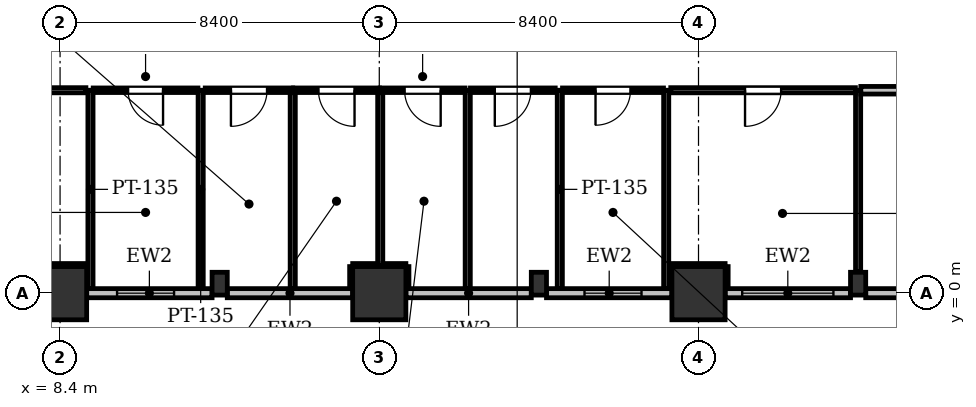
"""IFC4 building model, lengths in metres.
Left out: names, types, materials, properties, quantities, classifications, styles, units other than length and angle.
Written with IfcOpenShell. Run it as: python <this file> out.ifc"""

import sys

from ifc_helpers import new_model, si_unit, direction, frame, frame_2d, origin, origin_2d, place, context, subcontext, project, spatial, rectangle, extrude, element, fill, save


model = new_model("IFC4")
c1 = context("Model", 3, precision=1e-05, world=origin(), true_north=direction((0.0, 1.0)))
c2 = subcontext(c1, "Body", "Model", "MODEL_VIEW")
j1 = project(units=[si_unit("LENGTHUNIT", "METRE"), si_unit("PLANEANGLEUNIT", "RADIAN")], contexts=[c1])
p1 = place(None, origin())
s1 = spatial("IfcSite", under=j1, at=p1, CompositionType="ELEMENT")
p2 = place(p1, origin())
s2 = spatial("IfcBuilding", under=s1, at=p2, CompositionType="ELEMENT")
p3 = place(p2, frame((0.0, 0.0, 10.2)))
s3 = spatial("IfcBuildingStorey", under=s2, at=p3, CompositionType="ELEMENT", Elevation=10.2)
for number, where, z_axis, x_axis in (
    (1, (8.4, 0.0, 0.0), (0.0, 0.0, 1.0), (1.0, 0.0, 0.0)),
    (2, (16.8, 0.0, 0.0), (0.0, 0.0, 1.0), (1.0, 0.0, 0.0)),
    (3, (25.2, 0.0, 0.0), (0.0, 0.0, 1.0), (1.0, 0.0, 0.0)),
):
    element("IfcColumn", number, at=place(p3, frame(where, z_axis=z_axis, x_axis=x_axis)), inside=s3, PredefinedType="COLUMN", context=c2, shape_type="SweptSolid", body=[
        extrude(rectangle(XDim=1.4, YDim=1.4, at=origin_2d()), origin(), (0.0, 0.0, 1.0), 4.8),
    ])
for number, where, z_axis, x_axis in (
    (4, (12.6, 0.25, 0.0), (0.0, 0.0, 1.0), (1.0, 0.0, 0.0)),
    (5, (21.0, 0.25, 0.0), (0.0, 0.0, 1.0), (1.0, 0.0, 0.0)),
    (6, (29.4, 0.25, 0.0), (0.0, 0.0, 1.0), (1.0, 0.0, 0.0)),
):
    element("IfcColumn", number, at=place(p3, frame(where, z_axis=z_axis, x_axis=x_axis)), inside=s3, PredefinedType="PILASTER", context=c2, shape_type="SweptSolid", body=[
        extrude(rectangle(XDim=0.4, YDim=0.6, at=origin_2d()), origin(), (0.0, 0.0, 1.0), 4.8),
    ])
p4 = place(p3, frame((32.9, 0.0, 0.0), z_axis=(0.0, 0.0, 1.0), x_axis=(-1.0, 0.0, 0.0)))
e7 = element("IfcWall", 7, at=p4, inside=s3, PredefinedType="STANDARD", context=c2, shape_type="SweptSolid", body=[
    extrude(rectangle(XDim=3.3, YDim=0.24, at=frame_2d((1.65, 0.0))), origin(), (0.0, 0.0, 1.0), 3.725),
])
p5 = place(p4, frame((0.9, 0.0, 0.9)))
e8 = element("IfcOpeningElement", 8, at=p5, cuts=e7, PredefinedType="OPENING", context=c2, shape_type="SweptSolid", body=[
    extrude(rectangle(XDim=1.5, YDim=1.6, at=frame_2d((0.75, 0.8))), frame((0.0, 0.13, 0.0), z_axis=(0.0, -1.0, 0.0), x_axis=(1.0, 0.0, 0.0)), (0.0, 0.0, 1.0), 0.26),
])
p6 = place(p3, frame((29.2, 0.0, 0.0), z_axis=(0.0, 0.0, 1.0), x_axis=(-1.0, 0.0, 0.0)))
e9 = element("IfcWall", 9, at=p6, inside=s3, PredefinedType="STANDARD", context=c2, shape_type="SweptSolid", body=[
    extrude(rectangle(XDim=3.3, YDim=0.24, at=frame_2d((1.65, 0.0))), origin(), (0.0, 0.0, 1.0), 3.725),
])
p7 = place(p6, frame((0.45, 0.0, 0.9)))
e10 = element("IfcOpeningElement", 10, at=p7, cuts=e9, PredefinedType="OPENING", context=c2, shape_type="SweptSolid", body=[
    extrude(rectangle(XDim=2.4, YDim=1.8, at=frame_2d((1.2, 0.9))), frame((0.0, 0.13, 0.0), z_axis=(0.0, -1.0, 0.0), x_axis=(1.0, 0.0, 0.0)), (0.0, 0.0, 1.0), 0.26),
])
p8 = place(p3, frame((24.5, 0.0, 0.0), z_axis=(0.0, 0.0, 1.0), x_axis=(-1.0, 0.0, 0.0)))
e11 = element("IfcWall", 11, at=p8, inside=s3, PredefinedType="STANDARD", context=c2, shape_type="SweptSolid", body=[
    extrude(rectangle(XDim=3.3, YDim=0.24, at=frame_2d((1.65, 0.0))), origin(), (0.0, 0.0, 1.0), 3.725),
])
p9 = place(p8, frame((0.8, 0.0, 0.9)))
e12 = element("IfcOpeningElement", 12, at=p9, cuts=e11, PredefinedType="OPENING", context=c2, shape_type="SweptSolid", body=[
    extrude(rectangle(XDim=1.5, YDim=1.6, at=frame_2d((0.75, 0.8))), frame((0.0, 0.13, 0.0), z_axis=(0.0, -1.0, 0.0), x_axis=(1.0, 0.0, 0.0)), (0.0, 0.0, 1.0), 0.26),
])
for number, where, z_axis, x_axis in (
    (13, (20.8, 0.0, 0.0), (0.0, 0.0, 1.0), (-1.0, 0.0, 0.0)),
    (14, (16.1, 0.0, 0.0), (0.0, 0.0, 1.0), (-1.0, 0.0, 0.0)),
):
    element("IfcWall", number, at=place(p3, frame(where, z_axis=z_axis, x_axis=x_axis)), inside=s3, PredefinedType="STANDARD", context=c2, shape_type="SweptSolid", body=[
        extrude(rectangle(XDim=3.3, YDim=0.24, at=frame_2d((1.65, 0.0))), origin(), (0.0, 0.0, 1.0), 3.725),
    ])
p10 = place(p3, frame((12.4, 0.0, 0.0), z_axis=(0.0, 0.0, 1.0), x_axis=(-1.0, 0.0, 0.0)))
e15 = element("IfcWall", 15, at=p10, inside=s3, PredefinedType="STANDARD", context=c2, shape_type="SweptSolid", body=[
    extrude(rectangle(XDim=3.3, YDim=0.24, at=frame_2d((1.65, 0.0))), origin(), (0.0, 0.0, 1.0), 3.725),
])
p11 = place(p10, frame((1.0, 0.0, 0.9)))
e16 = element("IfcOpeningElement", 16, at=p11, cuts=e15, PredefinedType="OPENING", context=c2, shape_type="SweptSolid", body=[
    extrude(rectangle(XDim=1.5, YDim=1.6, at=frame_2d((0.75, 0.8))), frame((0.0, 0.13, 0.0), z_axis=(0.0, -1.0, 0.0), x_axis=(1.0, 0.0, 0.0)), (0.0, 0.0, 1.0), 0.26),
])
for number, where, z_axis, x_axis in (
    (17, (9.2, 5.34, 0.0), (0.0, 0.0, 1.0), (0.0, -1.0, 0.0)),
    (18, (12.1, 0.124, 0.0), (0.0, 0.0, 1.0), (0.0, 1.0, 0.0)),
):
    element("IfcWall", number, at=place(p3, frame(where, z_axis=z_axis, x_axis=x_axis)), inside=s3, PredefinedType="PARTITIONING", context=c2, shape_type="SweptSolid", body=[
        extrude(rectangle(XDim=5.216, YDim=0.135, at=frame_2d((2.608, 0.0))), origin(), (0.0, 0.0, 1.0), 4.525),
    ])
p12 = place(p3, frame((12.029, 5.34, 0.0), z_axis=(0.0, 0.0, 1.0), x_axis=(-1.0, 0.0, 0.0)))
e19 = element("IfcWall", 19, at=p12, inside=s3, PredefinedType="PARTITIONING", context=c2, shape_type="SweptSolid", body=[
    extrude(rectangle(XDim=2.757, YDim=0.12, at=frame_2d((1.378, 0.0))), origin(), (0.0, 0.0, 1.0), 4.525),
])
p13 = place(p12, frame((0.918, 0.0, 0.0)))
e20 = element("IfcOpeningElement", 20, at=p13, cuts=e19, PredefinedType="OPENING", context=c2, shape_type="SweptSolid", body=[
    extrude(rectangle(XDim=0.92, YDim=2.1, at=frame_2d((0.46, 1.05))), frame((0.0, 0.07, 0.0), z_axis=(0.0, -1.0, 0.0), x_axis=(1.0, 0.0, 0.0)), (0.0, 0.0, 1.0), 0.14),
])
for number, where, z_axis, x_axis in (
    (21, (21.55, 5.34, 0.0), (0.0, 0.0, 1.0), (0.0, -1.0, 0.0)),
    (22, (24.35, 0.124, 0.0), (0.0, 0.0, 1.0), (0.0, 1.0, 0.0)),
):
    element("IfcWall", number, at=place(p3, frame(where, z_axis=z_axis, x_axis=x_axis)), inside=s3, PredefinedType="PARTITIONING", context=c2, shape_type="SweptSolid", body=[
        extrude(rectangle(XDim=5.216, YDim=0.135, at=frame_2d((2.608, 0.0))), origin(), (0.0, 0.0, 1.0), 4.525),
    ])
p14 = place(p3, frame((24.279, 5.34, 0.0), z_axis=(0.0, 0.0, 1.0), x_axis=(-1.0, 0.0, 0.0)))
e23 = element("IfcWall", 23, at=p14, inside=s3, PredefinedType="PARTITIONING", context=c2, shape_type="SweptSolid", body=[
    extrude(rectangle(XDim=2.657, YDim=0.12, at=frame_2d((1.329, 0.0))), origin(), (0.0, 0.0, 1.0), 4.525),
])
p15 = place(p14, frame((0.868, 0.0, 0.0)))
e24 = element("IfcOpeningElement", 24, at=p15, cuts=e23, PredefinedType="OPENING", context=c2, shape_type="SweptSolid", body=[
    extrude(rectangle(XDim=0.92, YDim=2.1, at=frame_2d((0.46, 1.05))), frame((0.0, 0.07, 0.0), z_axis=(0.0, -1.0, 0.0), x_axis=(1.0, 0.0, 0.0)), (0.0, 0.0, 1.0), 0.14),
])
p16 = place(p3, frame((19.127, 0.124, 0.0), z_axis=(0.0, 0.0, 1.0), x_axis=(0.0, 1.0, 0.0)))
e25 = element("IfcWall", 25, at=p16, inside=s3, PredefinedType="PARTITIONING", context=c2, shape_type="SweptSolid", body=[
    extrude(rectangle(XDim=5.216, YDim=0.135, at=frame_2d((2.608, 0.0))), origin(), (0.0, 0.0, 1.0), 4.525),
])
p17 = place(p3, frame((19.056, 5.34, 0.0), z_axis=(0.0, 0.0, 1.0), x_axis=(-1.0, 0.0, 0.0)))
e26 = element("IfcWall", 26, at=p17, inside=s3, PredefinedType="PARTITIONING", context=c2, shape_type="SweptSolid", body=[
    extrude(rectangle(XDim=2.231, YDim=0.12, at=frame_2d((1.115, 0.0))), origin(), (0.0, 0.0, 1.0), 3.913),
])
p18 = place(p17, frame((0.64, 0.0, 0.0)))
e27 = element("IfcOpeningElement", 27, at=p18, cuts=e26, PredefinedType="OPENING", context=c2, shape_type="SweptSolid", body=[
    extrude(rectangle(XDim=0.95, YDim=2.15, at=frame_2d((0.475, 1.075))), frame((0.0, 0.07, 0.0), z_axis=(0.0, -1.0, 0.0), x_axis=(1.0, 0.0, 0.0)), (0.0, 0.0, 1.0), 0.14),
])
p19 = place(p3, frame((16.825, 5.276, 0.0), z_axis=(0.0, 0.0, 1.0), x_axis=(0.0, -1.0, 0.0)))
e28 = element("IfcWall", 28, at=p19, inside=s3, PredefinedType="PARTITIONING", context=c2, shape_type="SweptSolid", body=[
    extrude(rectangle(XDim=4.556, YDim=0.135, at=frame_2d((2.278, 0.0))), origin(), (0.0, 0.0, 1.0), 3.913),
])
p20 = place(p3, frame((16.896, 0.72, 0.0), z_axis=(0.0, 0.0, 1.0), x_axis=(1.0, 0.0, 0.0)))
e29 = element("IfcWall", 29, at=p20, inside=s3, PredefinedType="PARTITIONING", context=c2, shape_type="SweptSolid", body=[
    extrude(rectangle(XDim=0.604, YDim=0.12, at=frame_2d((0.302, 0.0))), origin(), (0.0, 0.0, 1.0), 4.525),
])
p21 = place(p3, frame((17.52, 0.7, 0.0), z_axis=(0.0, 0.0, 1.0), x_axis=(0.0, -1.0, 0.0)))
e30 = element("IfcWall", 30, at=p21, inside=s3, PredefinedType="PARTITIONING", context=c2, shape_type="SweptSolid", body=[
    extrude(rectangle(XDim=0.576, YDim=0.12, at=frame_2d((0.288, 0.0))), origin(), (0.0, 0.0, 1.0), 4.525),
])
p22 = place(p3, frame((14.522, 5.34, 0.0), z_axis=(0.0, 0.0, 1.0), x_axis=(-1.0, 0.0, 0.0)))
e31 = element("IfcWall", 31, at=p22, inside=s3, PredefinedType="PARTITIONING", context=c2, shape_type="SweptSolid", body=[
    extrude(rectangle(XDim=2.302, YDim=0.12, at=frame_2d((1.151, 0.0))), origin(), (0.0, 0.0, 1.0), 4.122),
])
p23 = place(p22, frame((0.676, 0.0, 0.0)))
e32 = element("IfcOpeningElement", 32, at=p23, cuts=e31, PredefinedType="OPENING", context=c2, shape_type="SweptSolid", body=[
    extrude(rectangle(XDim=0.95, YDim=2.15, at=frame_2d((0.475, 1.075))), frame((0.0, 0.07, 0.0), z_axis=(0.0, -1.0, 0.0), x_axis=(1.0, 0.0, 0.0)), (0.0, 0.0, 1.0), 0.14),
])
p24 = place(p3, frame((14.522, 0.124, 0.0), z_axis=(0.0, 0.0, 1.0), x_axis=(0.0, 1.0, 0.0)))
e33 = element("IfcWall", 33, at=p24, inside=s3, PredefinedType="PARTITIONING", context=c2, shape_type="SweptSolid", body=[
    extrude(rectangle(XDim=5.152, YDim=0.135, at=frame_2d((2.576, 0.0))), origin(), (0.0, 0.0, 1.0), 4.525),
])
p25 = place(p3, frame((16.08, 0.124, 0.0), z_axis=(0.0, 0.0, 1.0), x_axis=(0.0, 1.0, 0.0)))
e34 = element("IfcWall", 34, at=p25, inside=s3, PredefinedType="PARTITIONING", context=c2, shape_type="SweptSolid", body=[
    extrude(rectangle(XDim=0.576, YDim=0.12, at=frame_2d((0.288, 0.0))), origin(), (0.0, 0.0, 1.0), 4.525),
])
p26 = place(p3, frame((16.1, 0.72, 0.0), z_axis=(0.0, 0.0, 1.0), x_axis=(1.0, 0.0, 0.0)))
e35 = element("IfcWall", 35, at=p26, inside=s3, PredefinedType="PARTITIONING", context=c2, shape_type="SweptSolid", body=[
    extrude(rectangle(XDim=0.653, YDim=0.12, at=frame_2d((0.327, 0.0))), origin(), (0.0, 0.0, 1.0), 3.913),
])
p27 = place(p3, frame((16.805, 5.34, 0.0), z_axis=(0.0, 0.0, 1.0), x_axis=(-1.0, 0.0, 0.0)))
e36 = element("IfcWall", 36, at=p27, inside=s3, PredefinedType="PARTITIONING", context=c2, shape_type="SweptSolid", body=[
    extrude(rectangle(XDim=2.262, YDim=0.12, at=frame_2d((1.131, 0.0))), origin(), (0.0, 0.0, 1.0), 3.913),
])
p28 = place(p27, frame((0.656, 0.0, 0.0)))
e37 = element("IfcOpeningElement", 37, at=p28, cuts=e36, PredefinedType="OPENING", context=c2, shape_type="SweptSolid", body=[
    extrude(rectangle(XDim=0.95, YDim=2.15, at=frame_2d((0.475, 1.075))), frame((0.0, 0.07, 0.0), z_axis=(0.0, -1.0, 0.0), x_axis=(1.0, 0.0, 0.0)), (0.0, 0.0, 1.0), 0.14),
])
p29 = place(p3, frame((21.43, 5.34, 0.0), z_axis=(0.0, 0.0, 1.0), x_axis=(-1.0, 0.0, 0.0)))
e38 = element("IfcWall", 38, at=p29, inside=s3, PredefinedType="PARTITIONING", context=c2, shape_type="SweptSolid", body=[
    extrude(rectangle(XDim=2.231, YDim=0.12, at=frame_2d((1.115, 0.0))), origin(), (0.0, 0.0, 1.0), 4.122),
])
p30 = place(p29, frame((0.64, 0.0, 0.0)))
e39 = element("IfcOpeningElement", 39, at=p30, cuts=e38, PredefinedType="OPENING", context=c2, shape_type="SweptSolid", body=[
    extrude(rectangle(XDim=0.95, YDim=2.15, at=frame_2d((0.475, 1.075))), frame((0.0, 0.07, 0.0), z_axis=(0.0, -1.0, 0.0), x_axis=(1.0, 0.0, 0.0)), (0.0, 0.0, 1.0), 0.14),
])
p31 = place(p3, frame((24.5, 0.72, 0.0), z_axis=(0.0, 0.0, 1.0), x_axis=(1.0, 0.0, 0.0)))
e40 = element("IfcWall", 40, at=p31, inside=s3, PredefinedType="PARTITIONING", context=c2, shape_type="SweptSolid", body=[
    extrude(rectangle(XDim=1.4, YDim=0.12, at=frame_2d((0.7, 0.0))), origin(), (0.0, 0.0, 1.0), 3.913),
])
p32 = place(p3, frame((25.92, 0.7, 0.0), z_axis=(0.0, 0.0, 1.0), x_axis=(0.0, -1.0, 0.0)))
e41 = element("IfcWall", 41, at=p32, inside=s3, PredefinedType="PARTITIONING", context=c2, shape_type="SweptSolid", body=[
    extrude(rectangle(XDim=0.576, YDim=0.12, at=frame_2d((0.288, 0.0))), origin(), (0.0, 0.0, 1.0), 4.525),
])
p33 = place(p3, frame((29.4, 0.57, 0.0), z_axis=(0.0, 0.0, 1.0), x_axis=(0.0, 1.0, 0.0)))
e42 = element("IfcWall", 42, at=p33, inside=s3, PredefinedType="PARTITIONING", context=c2, shape_type="SweptSolid", body=[
    extrude(rectangle(XDim=4.77, YDim=0.135, at=frame_2d((2.385, 0.0))), origin(), (0.0, 0.0, 1.0), 4.122),
])
p34 = place(p3, frame((29.329, 5.34, 0.0), z_axis=(0.0, 0.0, 1.0), x_axis=(-1.0, 0.0, 0.0)))
e43 = element("IfcWall", 43, at=p34, inside=s3, PredefinedType="PARTITIONING", context=c2, shape_type="SweptSolid", body=[
    extrude(rectangle(XDim=4.859, YDim=0.135, at=frame_2d((2.429, 0.0))), origin(), (0.0, 0.0, 1.0), 3.913),
])
p35 = place(p34, frame((1.954, 0.0, 0.0)))
e44 = element("IfcOpeningElement", 44, at=p35, cuts=e43, PredefinedType="OPENING", context=c2, shape_type="SweptSolid", body=[
    extrude(rectangle(XDim=0.95, YDim=2.15, at=frame_2d((0.475, 1.075))), frame((0.0, 0.077, 0.0), z_axis=(0.0, -1.0, 0.0), x_axis=(1.0, 0.0, 0.0)), (0.0, 0.0, 1.0), 0.155),
])
p36 = place(p3, frame((44.05, 5.34, 0.0), z_axis=(0.0, 0.0, 1.0), x_axis=(-1.0, 0.0, 0.0)))
e45 = element("IfcWall", 45, at=p36, inside=s3, PredefinedType="PARTITIONING", context=c2, shape_type="SweptSolid", body=[
    extrude(rectangle(XDim=14.579, YDim=0.2, at=frame_2d((7.289, 0.0))), origin(), (0.0, 0.0, 1.0), 3.913),
])
p37 = place(p36, frame((6.789, 0.0, 0.0)))
e46 = element("IfcOpeningElement", 46, at=p37, cuts=e45, PredefinedType="OPENING", context=c2, shape_type="SweptSolid", body=[
    extrude(rectangle(XDim=1.0, YDim=2.15, at=frame_2d((0.5, 1.075))), frame((0.0, 0.11, 0.0), z_axis=(0.0, -1.0, 0.0), x_axis=(1.0, 0.0, 0.0)), (0.0, 0.0, 1.0), 0.22),
])
p38 = place(p3, frame((7.7, 0.72, 0.0), z_axis=(0.0, 0.0, 1.0), x_axis=(1.0, 0.0, 0.0)))
e47 = element("IfcWall", 47, at=p38, inside=s3, PredefinedType="PARTITIONING", context=c2, shape_type="SweptSolid", body=[
    extrude(rectangle(XDim=1.38, YDim=0.12, at=frame_2d((0.69, 0.0))), origin(), (0.0, 0.0, 1.0), 3.913),
])
p39 = place(p3, frame((9.08, 5.34, 0.0), z_axis=(0.0, 0.0, 1.0), x_axis=(-1.0, 0.0, 0.0)))
e48 = element("IfcWall", 48, at=p39, inside=s3, PredefinedType="PARTITIONING", context=c2, shape_type="SweptSolid", body=[
    extrude(rectangle(XDim=3.68, YDim=0.135, at=frame_2d((1.84, 0.0))), origin(), (0.0, 0.0, 1.0), 3.913),
])
p40 = place(p7, origin())
e49 = element("IfcWindow", 49, at=p40, inside=s3, PartitioningType="SINGLE_PANEL", PredefinedType="WINDOW", context=c2, shape_type="SweptSolid", body=[
    extrude(rectangle(XDim=2.4, YDim=1.8, at=frame_2d((1.2, 0.9))), frame((0.0, 0.03, 0.0), z_axis=(0.0, -1.0, 0.0), x_axis=(1.0, 0.0, 0.0)), (0.0, 0.0, 1.0), 0.06),
])
fill(e10, e49)
p41 = place(p9, origin())
e50 = element("IfcWindow", 50, at=p41, inside=s3, PartitioningType="SINGLE_PANEL", PredefinedType="WINDOW", context=c2, shape_type="SweptSolid", body=[
    extrude(rectangle(XDim=1.5, YDim=1.6, at=frame_2d((0.75, 0.8))), frame((0.0, 0.03, 0.0), z_axis=(0.0, -1.0, 0.0), x_axis=(1.0, 0.0, 0.0)), (0.0, 0.0, 1.0), 0.06),
])
fill(e12, e50)
p42 = place(p11, origin())
e51 = element("IfcWindow", 51, at=p42, inside=s3, PartitioningType="SINGLE_PANEL", PredefinedType="WINDOW", context=c2, shape_type="SweptSolid", body=[
    extrude(rectangle(XDim=1.5, YDim=1.6, at=frame_2d((0.75, 0.8))), frame((0.0, 0.03, 0.0), z_axis=(0.0, -1.0, 0.0), x_axis=(1.0, 0.0, 0.0)), (0.0, 0.0, 1.0), 0.06),
])
fill(e16, e51)
p43 = place(p13, origin())
e52 = element("IfcDoor", 52, at=p43, inside=s3, OperationType="SINGLE_SWING_LEFT", PredefinedType="DOOR", context=c2, shape_type="SweptSolid", body=[
    extrude(rectangle(XDim=0.92, YDim=2.1, at=frame_2d((0.46, 1.05))), frame((0.0, 0.025, 0.0), z_axis=(0.0, -1.0, 0.0), x_axis=(1.0, 0.0, 0.0)), (0.0, 0.0, 1.0), 0.05),
])
fill(e20, e52)
p44 = place(p15, origin())
e53 = element("IfcDoor", 53, at=p44, inside=s3, OperationType="SINGLE_SWING_RIGHT", PredefinedType="DOOR", context=c2, shape_type="SweptSolid", body=[
    extrude(rectangle(XDim=0.92, YDim=2.1, at=frame_2d((0.46, 1.05))), frame((0.0, 0.025, 0.0), z_axis=(0.0, -1.0, 0.0), x_axis=(1.0, 0.0, 0.0)), (0.0, 0.0, 1.0), 0.05),
])
fill(e24, e53)
p45 = place(p18, origin())
e54 = element("IfcDoor", 54, at=p45, inside=s3, OperationType="SINGLE_SWING_LEFT", PredefinedType="DOOR", context=c2, shape_type="SweptSolid", body=[
    extrude(rectangle(XDim=0.95, YDim=2.15, at=frame_2d((0.475, 1.075))), frame((0.0, 0.025, 0.0), z_axis=(0.0, -1.0, 0.0), x_axis=(1.0, 0.0, 0.0)), (0.0, 0.0, 1.0), 0.05),
])
fill(e27, e54)
p46 = place(p23, origin())
e55 = element("IfcDoor", 55, at=p46, inside=s3, OperationType="SINGLE_SWING_RIGHT", PredefinedType="DOOR", context=c2, shape_type="SweptSolid", body=[
    extrude(rectangle(XDim=0.95, YDim=2.15, at=frame_2d((0.475, 1.075))), frame((0.0, 0.025, 0.0), z_axis=(0.0, -1.0, 0.0), x_axis=(1.0, 0.0, 0.0)), (0.0, 0.0, 1.0), 0.05),
])
fill(e32, e55)
p47 = place(p28, origin())
e56 = element("IfcDoor", 56, at=p47, inside=s3, OperationType="SINGLE_SWING_LEFT", PredefinedType="DOOR", context=c2, shape_type="SweptSolid", body=[
    extrude(rectangle(XDim=0.95, YDim=2.15, at=frame_2d((0.475, 1.075))), frame((0.0, 0.025, 0.0), z_axis=(0.0, -1.0, 0.0), x_axis=(1.0, 0.0, 0.0)), (0.0, 0.0, 1.0), 0.05),
])
fill(e37, e56)
p48 = place(p30, origin())
e57 = element("IfcDoor", 57, at=p48, inside=s3, OperationType="SINGLE_SWING_RIGHT", PredefinedType="DOOR", context=c2, shape_type="SweptSolid", body=[
    extrude(rectangle(XDim=0.95, YDim=2.15, at=frame_2d((0.475, 1.075))), frame((0.0, 0.025, 0.0), z_axis=(0.0, -1.0, 0.0), x_axis=(1.0, 0.0, 0.0)), (0.0, 0.0, 1.0), 0.05),
])
fill(e39, e57)
p49 = place(p35, origin())
e58 = element("IfcDoor", 58, at=p49, inside=s3, OperationType="SINGLE_SWING_RIGHT", PredefinedType="DOOR", context=c2, shape_type="SweptSolid", body=[
    extrude(rectangle(XDim=0.95, YDim=2.15, at=frame_2d((0.475, 1.075))), frame((0.0, 0.025, 0.0), z_axis=(0.0, -1.0, 0.0), x_axis=(1.0, 0.0, 0.0)), (0.0, 0.0, 1.0), 0.05),
])
fill(e44, e58)
save(model, sys.argv[1])
